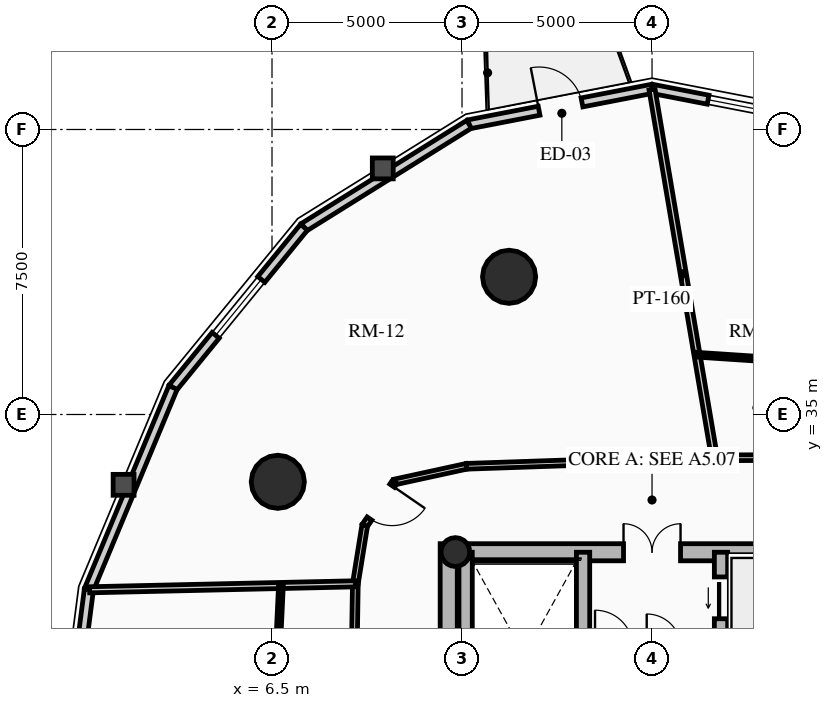
"""IFC4 building model, lengths in metres.
Left out: names, types, materials, properties, quantities, classifications, styles, units other than length and angle.
Written with IfcOpenShell. Run it as: python <this file> out.ifc"""

import sys

from ifc_helpers import new_model, si_unit, direction, frame, frame_2d, origin, origin_2d, place, context, subcontext, project, spatial, rectangle, circle, hollow_circle, extrude, source, transform, mapped, element, fill, save


model = new_model("IFC4")
c1 = context("Model", 3, precision=1e-05, world=origin(), true_north=direction((0.0, 1.0)))
c2 = subcontext(c1, "Body", "Model", "MODEL_VIEW")
j1 = project(units=[si_unit("LENGTHUNIT", "METRE"), si_unit("PLANEANGLEUNIT", "RADIAN")], contexts=[c1])
p1 = place(None, origin())
s1 = spatial("IfcSite", under=j1, at=p1, CompositionType="ELEMENT")
p2 = place(p1, origin())
s2 = spatial("IfcBuilding", under=s1, at=p2, CompositionType="ELEMENT")
p3 = place(p2, frame((0.0, 0.0, 105.07)))
s3 = spatial("IfcBuildingStorey", under=s2, at=p3, CompositionType="ELEMENT", Elevation=105.07)
p4 = place(p3, frame((11.15, 17.4, 0.0), z_axis=(0.0, 0.0, 1.0), x_axis=(0.0, 1.0, 0.0)))
e1 = element("IfcWall", 1, at=p4, inside=s3, PredefinedType="SHEAR", context=c2, shape_type="SweptSolid", body=[
    extrude(rectangle(XDim=14.2, YDim=0.45, at=frame_2d((7.1, 0.0))), origin(), (0.0, 0.0, 1.0), 2.91),
])
p5 = place(p3, frame((11.15, 31.375, 0.0), z_axis=(0.0, 0.0, 1.0), x_axis=(1.0, 0.0, 0.0)))
e2 = element("IfcWall", 2, at=p5, inside=s3, PredefinedType="SHEAR", context=c2, shape_type="SweptSolid", body=[
    extrude(rectangle(XDim=10.7, YDim=0.45, at=frame_2d((5.35, 0.0))), origin(), (0.0, 0.0, 1.0), 2.91),
])
m1 = source(origin(), c2, "Body", "SweptSolid", [
    extrude(rectangle(XDim=1.5, YDim=2.02, at=frame_2d((0.75, 1.01))), frame((0.0, 0.235, 0.0), z_axis=(0.0, -1.0, 0.0), x_axis=(1.0, 0.0, 0.0)), (0.0, 0.0, 1.0), 0.47),
])
p6 = place(p5, frame((4.6, 0.0, 0.0)))
e3 = element("IfcOpeningElement", 3, at=p6, cuts=e2, PredefinedType="OPENING", context=c2, shape_type="MappedRepresentation", body=[
    mapped(m1, transform((0.0, 0.0, 0.0), x_axis=(1.0, 0.0, 0.0), y_axis=(0.0, 1.0, 0.0), z_axis=(0.0, 0.0, 1.0), scale=1.0)),
])
p7 = place(p3, frame((14.685, 17.625, 0.0), z_axis=(0.0, 0.0, 1.0), x_axis=(0.0, 1.0, 0.0)))
e4 = element("IfcWall", 4, at=p7, inside=s3, PredefinedType="SHEAR", context=c2, shape_type="SweptSolid", body=[
    extrude(rectangle(XDim=13.75, YDim=0.35, at=frame_2d((6.875, 0.0))), origin(), (0.0, 0.0, 1.0), 2.91),
])
m2 = source(origin(), c2, "Body", "SweptSolid", [
    extrude(rectangle(XDim=1.1, YDim=2.015, at=frame_2d((0.55, 1.007))), frame((0.0, 0.185, 0.0), z_axis=(0.0, -1.0, 0.0), x_axis=(1.0, 0.0, 0.0)), (0.0, 0.0, 1.0), 0.37),
])
p8 = place(p7, frame((4.875, 0.0, 0.0)))
e5 = element("IfcOpeningElement", 5, at=p8, cuts=e4, PredefinedType="OPENING", context=c2, shape_type="MappedRepresentation", body=[
    mapped(m2, transform((0.0, 0.0, 0.0), x_axis=(1.0, 0.0, 0.0), y_axis=(0.0, 1.0, 0.0), z_axis=(0.0, 0.0, 1.0), scale=1.0)),
])
m3 = source(origin(), c2, "Body", "SweptSolid", [
    extrude(rectangle(XDim=1.15, YDim=2.02, at=frame_2d((0.575, 1.01))), frame((0.0, 0.185, 0.0), z_axis=(0.0, -1.0, 0.0), x_axis=(1.0, 0.0, 0.0)), (0.0, 0.0, 1.0), 0.37),
])
p9 = place(p7, frame((7.295, 0.0, 0.0)))
e6 = element("IfcOpeningElement", 6, at=p9, cuts=e4, PredefinedType="OPENING", context=c2, shape_type="MappedRepresentation", body=[
    mapped(m3, transform((0.0, 0.0, 0.0), x_axis=(1.0, 0.0, 0.0), y_axis=(0.0, 1.0, 0.0), z_axis=(0.0, 0.0, 1.0), scale=1.0)),
])
p10 = place(p3, frame((18.315, 17.625, 0.0), z_axis=(0.0, 0.0, 1.0), x_axis=(0.0, 1.0, 0.0)))
e7 = element("IfcWall", 7, at=p10, inside=s3, PredefinedType="SHEAR", context=c2, shape_type="SweptSolid", body=[
    extrude(rectangle(XDim=13.75, YDim=0.35, at=frame_2d((6.875, 0.0))), origin(), (0.0, 0.0, 1.0), 2.91),
])
p11 = place(p10, frame((10.0, 0.0, 0.0)))
e8 = element("IfcOpeningElement", 8, at=p11, cuts=e7, PredefinedType="OPENING", context=c2, shape_type="MappedRepresentation", body=[
    mapped(m2, transform((0.0, 0.0, 0.0), x_axis=(1.0, 0.0, 0.0), y_axis=(0.0, 1.0, 0.0), z_axis=(0.0, 0.0, 1.0), scale=1.0)),
])
p12 = place(p10, frame((12.0, 0.0, 0.0)))
e9 = element("IfcOpeningElement", 9, at=p12, cuts=e7, PredefinedType="OPENING", context=c2, shape_type="MappedRepresentation", body=[
    mapped(m2, transform((0.0, 0.0, 0.0), x_axis=(1.0, 0.0, 0.0), y_axis=(0.0, 1.0, 0.0), z_axis=(0.0, 0.0, 1.0), scale=1.0)),
])
p13 = place(p10, frame((5.305, 0.0, 0.0)))
e10 = element("IfcOpeningElement", 10, at=p13, cuts=e7, PredefinedType="OPENING", context=c2, shape_type="MappedRepresentation", body=[
    mapped(m3, transform((0.0, 0.0, 0.0), x_axis=(1.0, 0.0, 0.0), y_axis=(0.0, 1.0, 0.0), z_axis=(0.0, 0.0, 1.0), scale=1.0)),
])
p14 = place(p3, frame((11.595, 24.655, 0.0), z_axis=(0.0, 0.0, 1.0), x_axis=(0.0, 1.0, 0.0)))
e11 = element("IfcWall", 11, at=p14, inside=s3, PredefinedType="SHEAR", context=c2, shape_type="SweptSolid", body=[
    extrude(rectangle(XDim=6.72, YDim=0.35, at=frame_2d((3.36, 0.0))), origin(), (0.0, 0.0, 1.0), 2.91),
])
p15 = place(p3, frame((11.325, 31.38, 0.0), z_axis=(0.0, 0.0, 1.0), x_axis=(1.0, 0.0, 0.0)))
e12 = element("IfcColumn", 12, at=p15, inside=s3, PredefinedType="COLUMN", context=c2, shape_type="SweptSolid", body=[
    extrude(hollow_circle(Radius=0.38, WallThickness=0.032, at=origin_2d()), origin(), (0.0, 0.0, 1.0), 2.91),
])
for number, where, z_axis, x_axis in (
    (13, (12.739, 38.623, 0.0), (0.0, 0.0, 1.0), (1.0, 0.0, 0.0)),
    (14, (6.653, 33.229, 0.0), (0.0, 0.0, 1.0), (1.0, 0.0, 0.0)),
):
    element("IfcColumn", number, at=place(p3, frame(where, z_axis=z_axis, x_axis=x_axis)), inside=s3, PredefinedType="USERDEFINED", context=c2, shape_type="SweptSolid", body=[
        extrude(circle(Radius=0.7, at=origin_2d()), origin(), (0.0, 0.0, 1.0), 2.91),
    ])
p16 = place(p3, frame((16.5, 43.57, 0.0), z_axis=(0.0, 0.0, 1.0), x_axis=(0.981723785992, -0.190311344954, 0.0)))
e15 = element("IfcWall", 15, at=p16, inside=s3, PredefinedType="SOLIDWALL", context=c2, shape_type="SweptSolid", body=[
    extrude(rectangle(XDim=4.904, YDim=0.24, at=frame_2d((2.452, 0.0))), origin(), (0.0, 0.0, 1.0), 2.179),
])
m4 = source(origin(), c2, "Body", "SweptSolid", [
    extrude(rectangle(XDim=1.9, YDim=1.35, at=frame_2d((0.95, 0.675))), frame((0.0, 0.13, 0.0), z_axis=(0.0, -1.0, 0.0), x_axis=(1.0, 0.0, 0.0)), (0.0, 0.0, 1.0), 0.26),
])
p17 = place(p16, frame((1.502, 0.0, 0.65)))
e16 = element("IfcOpeningElement", 16, at=p17, cuts=e15, PredefinedType="OPENING", context=c2, shape_type="MappedRepresentation", body=[
    mapped(m4, transform((0.0, 0.0, 0.0), x_axis=(1.0, 0.0, 0.0), y_axis=(0.0, 1.0, 0.0), z_axis=(0.0, 0.0, 1.0), scale=1.0)),
])
p18 = place(p3, frame((11.685, 42.637, 0.0), z_axis=(0.0, 0.0, 1.0), x_axis=(0.981723785992, 0.190311344954, 0.0)))
e17 = element("IfcWall", 17, at=p18, inside=s3, PredefinedType="SOLIDWALL", context=c2, shape_type="SweptSolid", body=[
    extrude(rectangle(XDim=4.904, YDim=0.24, at=frame_2d((2.452, 0.0))), origin(), (0.0, 0.0, 1.0), 2.179),
])
m5 = source(origin(), c2, "Body", "SweptSolid", [
    extrude(rectangle(XDim=1.15, YDim=2.005, at=frame_2d((0.575, 1.002))), frame((0.0, 0.13, 0.0), z_axis=(0.0, -1.0, 0.0), x_axis=(1.0, 0.0, 0.0)), (0.0, 0.0, 1.0), 0.26),
])
p19 = place(p18, frame((1.877, 0.0, 0.0)))
e18 = element("IfcOpeningElement", 18, at=p19, cuts=e17, PredefinedType="OPENING", context=c2, shape_type="MappedRepresentation", body=[
    mapped(m5, transform((0.0, 0.0, 0.0), x_axis=(1.0, 0.0, 0.0), y_axis=(0.0, 1.0, 0.0), z_axis=(0.0, 0.0, 1.0), scale=1.0)),
])
p20 = place(p3, frame((7.342, 39.928, 0.0), z_axis=(0.0, 0.0, 1.0), x_axis=(0.848520380187, 0.529162701263, 0.0)))
e19 = element("IfcWall", 19, at=p20, inside=s3, PredefinedType="SOLIDWALL", context=c2, shape_type="SweptSolid", body=[
    extrude(rectangle(XDim=5.119, YDim=0.24, at=frame_2d((2.56, 0.0))), origin(), (0.0, 0.0, 1.0), 2.179),
])
p21 = place(p3, frame((3.895, 35.709, 0.0), z_axis=(0.0, 0.0, 1.0), x_axis=(0.632700781152, 0.77439635945, 0.0)))
e20 = element("IfcWall", 20, at=p21, inside=s3, PredefinedType="SOLIDWALL", context=c2, shape_type="SweptSolid", body=[
    extrude(rectangle(XDim=5.448, YDim=0.24, at=frame_2d((2.724, 0.0))), origin(), (0.0, 0.0, 1.0), 2.179),
])
p22 = place(p21, frame((1.774, 0.0, 0.65)))
e21 = element("IfcOpeningElement", 21, at=p22, cuts=e20, PredefinedType="OPENING", context=c2, shape_type="MappedRepresentation", body=[
    mapped(m4, transform((0.0, 0.0, 0.0), x_axis=(1.0, 0.0, 0.0), y_axis=(0.0, 1.0, 0.0), z_axis=(0.0, 0.0, 1.0), scale=1.0)),
])
p23 = place(p3, frame((1.682, 30.393, 0.0), z_axis=(0.0, 0.0, 1.0), x_axis=(0.384344417632, 0.923189779317, 0.0)))
e22 = element("IfcWall", 22, at=p23, inside=s3, PredefinedType="SOLIDWALL", context=c2, shape_type="SweptSolid", body=[
    extrude(rectangle(XDim=5.758, YDim=0.24, at=frame_2d((2.879, 0.0))), origin(), (0.0, 0.0, 1.0), 2.179),
])
p24 = place(p3, frame((0.919, 24.5, 0.0), z_axis=(0.0, 0.0, 1.0), x_axis=(0.128351991996, 0.991728675672, 0.0)))
e23 = element("IfcWall", 23, at=p24, inside=s3, PredefinedType="SOLIDWALL", context=c2, shape_type="SweptSolid", body=[
    extrude(rectangle(XDim=5.942, YDim=0.24, at=frame_2d((2.971, 0.0))), origin(), (0.0, 0.0, 1.0), 2.179),
])
m6 = source(origin(), c2, "Body", "SweptSolid", [
    extrude(rectangle(XDim=2.2, YDim=1.35, at=frame_2d((1.1, 0.675))), frame((0.0, 0.13, 0.0), z_axis=(0.0, -1.0, 0.0), x_axis=(1.0, 0.0, 0.0)), (0.0, 0.0, 1.0), 0.26),
])
p25 = place(p24, frame((1.871, 0.0, 0.65)))
e24 = element("IfcOpeningElement", 24, at=p25, cuts=e23, PredefinedType="OPENING", context=c2, shape_type="MappedRepresentation", body=[
    mapped(m6, transform((0.0, 0.0, 0.0), x_axis=(1.0, 0.0, 0.0), y_axis=(0.0, 1.0, 0.0), z_axis=(0.0, 0.0, 1.0), scale=1.0)),
])
p26 = place(p3, frame((21.527, 33.873, 0.0), z_axis=(0.0, 0.0, 1.0), x_axis=(-0.999991838845, -0.004040079574, 0.0)))
e25 = element("IfcWall", 25, at=p26, inside=s3, PredefinedType="PARTITIONING", context=c2, shape_type="SweptSolid", body=[
    extrude(rectangle(XDim=3.384, YDim=0.15, at=frame_2d((1.692, 0.0))), origin(), (0.0, 0.0, 1.0), 2.225),
])
p27 = place(p3, frame((18.143, 33.86, 0.0), z_axis=(0.0, 0.0, 1.0), x_axis=(-0.999419208319, -0.034077060363, 0.0)))
e26 = element("IfcWall", 26, at=p27, inside=s3, PredefinedType="PARTITIONING", context=c2, shape_type="SweptSolid", body=[
    extrude(rectangle(XDim=6.527, YDim=0.15, at=frame_2d((3.263, 0.0))), origin(), (0.0, 0.0, 1.0), 2.225),
])
p28 = place(p3, frame((11.62, 33.637, 0.0), z_axis=(0.0, 0.0, 1.0), x_axis=(-0.97702579435, -0.213121085711, 0.0)))
e27 = element("IfcWall", 27, at=p28, inside=s3, PredefinedType="PARTITIONING", context=c2, shape_type="SweptSolid", body=[
    extrude(rectangle(XDim=1.935, YDim=0.15, at=frame_2d((0.967, 0.0))), origin(), (0.0, 0.0, 1.0), 2.225),
])
p29 = place(p3, frame((9.729, 33.225, 0.0), z_axis=(0.0, 0.0, 1.0), x_axis=(-0.567183649484, -0.82359134755, 0.0)))
e28 = element("IfcWall", 28, at=p29, inside=s3, PredefinedType="PARTITIONING", context=c2, shape_type="SweptSolid", body=[
    extrude(rectangle(XDim=1.392, YDim=0.15, at=frame_2d((0.696, 0.0))), origin(), (0.0, 0.0, 1.0), 2.225),
])
m7 = source(origin(), c2, "Body", "SweptSolid", [
    extrude(rectangle(XDim=1.05, YDim=2.015, at=frame_2d((0.525, 1.007))), frame((0.0, 0.085, 0.0), z_axis=(0.0, -1.0, 0.0), x_axis=(1.0, 0.0, 0.0)), (0.0, 0.0, 1.0), 0.17),
])
p30 = place(p29, frame((0.12, 0.0, 0.0)))
e29 = element("IfcOpeningElement", 29, at=p30, cuts=e28, PredefinedType="OPENING", context=c2, shape_type="MappedRepresentation", body=[
    mapped(m7, transform((0.0, 0.0, 0.0), x_axis=(1.0, 0.0, 0.0), y_axis=(0.0, 1.0, 0.0), z_axis=(0.0, 0.0, 1.0), scale=1.0)),
])
p31 = place(p3, frame((8.94, 32.078, 0.0), z_axis=(0.0, 0.0, 1.0), x_axis=(-0.159148467753, -0.98725466077, 0.0)))
e30 = element("IfcWall", 30, at=p31, inside=s3, PredefinedType="PARTITIONING", context=c2, shape_type="SweptSolid", body=[
    extrude(rectangle(XDim=1.554, YDim=0.15, at=frame_2d((0.777, 0.0))), origin(), (0.0, 0.0, 1.0), 2.225),
])
p32 = place(p3, frame((8.693, 30.544, 0.0), z_axis=(0.0, 0.0, 1.0), x_axis=(-0.015307007986, -0.99988284089, 0.0)))
e31 = element("IfcWall", 31, at=p32, inside=s3, PredefinedType="PARTITIONING", context=c2, shape_type="SweptSolid", body=[
    extrude(rectangle(XDim=6.045, YDim=0.15, at=frame_2d((3.022, 0.0))), origin(), (0.0, 0.0, 1.0), 2.655),
])
p33 = place(p3, frame((18.143, 33.86, 0.0), z_axis=(0.0, 0.0, 1.0), x_axis=(-0.167145472003, 0.985932244725, 0.0)))
e32 = element("IfcWall", 32, at=p33, inside=s3, PredefinedType="PARTITIONING", context=c2, shape_type="SweptSolid", body=[
    extrude(rectangle(XDim=9.829, YDim=0.16, at=frame_2d((4.914, 0.0))), origin(), (0.0, 0.0, 1.0), 2.179),
])
p34 = place(p3, frame((8.693, 30.544, 0.0), z_axis=(0.0, 0.0, 1.0), x_axis=(-0.999746482141, -0.022516026432, 0.0)))
e33 = element("IfcWall", 33, at=p34, inside=s3, PredefinedType="PARTITIONING", context=c2, shape_type="SweptSolid", body=[
    extrude(rectangle(XDim=6.994, YDim=0.16, at=frame_2d((3.497, 0.0))), origin(), (0.0, 0.0, 1.0), 2.179),
])
p35 = place(p3, frame((21.466, 36.322, 0.0), z_axis=(0.0, 0.0, 1.0), x_axis=(-0.997806476515, 0.066198454847, 0.0)))
e34 = element("IfcWall", 34, at=p35, inside=s3, PredefinedType="PARTITIONING", context=c2, shape_type="SweptSolid", body=[
    extrude(rectangle(XDim=3.791, YDim=0.125, at=frame_2d((1.896, 0.0))), origin(), (0.0, 0.0, 1.0), 2.225),
])
p36 = place(p3, frame((6.735, 30.5, 0.0), z_axis=(0.0, 0.0, 1.0), x_axis=(-0.046620801603, -0.998912659274, 0.0)))
e35 = element("IfcWall", 35, at=p36, inside=s3, PredefinedType="PARTITIONING", context=c2, shape_type="SweptSolid", body=[
    extrude(rectangle(XDim=6.007, YDim=0.125, at=frame_2d((3.003, 0.0))), origin(), (0.0, 0.0, 1.0), 2.655),
])
m8 = source(origin(), c2, "Body", "SweptSolid", [
    extrude(rectangle(XDim=1.9, YDim=1.35, at=frame_2d((0.95, 0.675))), frame((0.0, 0.03, 0.0), z_axis=(0.0, -1.0, 0.0), x_axis=(1.0, 0.0, 0.0)), (0.0, 0.0, 1.0), 0.06),
])
p37 = place(p17, origin())
e36 = element("IfcWindow", 36, at=p37, inside=s3, PartitioningType="DOUBLE_PANEL_VERTICAL", PredefinedType="WINDOW", context=c2, shape_type="MappedRepresentation", body=[
    mapped(m8, transform((0.0, 0.0, 0.0), x_axis=(1.0, 0.0, 0.0), y_axis=(0.0, 1.0, 0.0), z_axis=(0.0, 0.0, 1.0), scale=1.0)),
])
fill(e16, e36)
m9 = source(origin(), c2, "Body", "SweptSolid", [
    extrude(rectangle(XDim=1.15, YDim=2.005, at=frame_2d((0.575, 1.002))), frame((0.0, 0.025, 0.0), z_axis=(0.0, -1.0, 0.0), x_axis=(1.0, 0.0, 0.0)), (0.0, 0.0, 1.0), 0.05),
])
p38 = place(p19, origin())
e37 = element("IfcDoor", 37, at=p38, inside=s3, OperationType="SINGLE_SWING_LEFT", PredefinedType="DOOR", context=c2, shape_type="MappedRepresentation", body=[
    mapped(m9, transform((0.0, 0.0, 0.0), x_axis=(1.0, 0.0, 0.0), y_axis=(0.0, 1.0, 0.0), z_axis=(0.0, 0.0, 1.0), scale=1.0)),
])
fill(e18, e37)
p39 = place(p22, origin())
e38 = element("IfcWindow", 38, at=p39, inside=s3, PartitioningType="DOUBLE_PANEL_VERTICAL", PredefinedType="WINDOW", context=c2, shape_type="MappedRepresentation", body=[
    mapped(m8, transform((0.0, 0.0, 0.0), x_axis=(1.0, 0.0, 0.0), y_axis=(0.0, 1.0, 0.0), z_axis=(0.0, 0.0, 1.0), scale=1.0)),
])
fill(e21, e38)
m10 = source(origin(), c2, "Body", "SweptSolid", [
    extrude(rectangle(XDim=1.1, YDim=2.015, at=frame_2d((0.55, 1.007))), frame((0.0, 0.025, 0.0), z_axis=(0.0, -1.0, 0.0), x_axis=(1.0, 0.0, 0.0)), (0.0, 0.0, 1.0), 0.05),
])
p40 = place(p12, origin())
e39 = element("IfcDoor", 39, at=p40, inside=s3, OperationType="SLIDING_TO_LEFT", PredefinedType="DOOR", context=c2, shape_type="MappedRepresentation", body=[
    mapped(m10, transform((0.0, 0.0, 0.0), x_axis=(1.0, 0.0, 0.0), y_axis=(0.0, 1.0, 0.0), z_axis=(0.0, 0.0, 1.0), scale=1.0)),
])
fill(e9, e39)
m11 = source(origin(), c2, "Body", "SweptSolid", [
    extrude(rectangle(XDim=1.5, YDim=2.02, at=frame_2d((0.75, 1.01))), frame((0.0, 0.025, 0.0), z_axis=(0.0, -1.0, 0.0), x_axis=(1.0, 0.0, 0.0)), (0.0, 0.0, 1.0), 0.05),
])
p41 = place(p6, origin())
e40 = element("IfcDoor", 40, at=p41, inside=s3, OperationType="DOUBLE_DOOR_SINGLE_SWING", PredefinedType="DOOR", context=c2, shape_type="MappedRepresentation", body=[
    mapped(m11, transform((0.0, 0.0, 0.0), x_axis=(1.0, 0.0, 0.0), y_axis=(0.0, 1.0, 0.0), z_axis=(0.0, 0.0, 1.0), scale=1.0)),
])
fill(e3, e40)
m12 = source(origin(), c2, "Body", "SweptSolid", [
    extrude(rectangle(XDim=1.05, YDim=2.015, at=frame_2d((0.525, 1.007))), frame((0.0, 0.025, 0.0), z_axis=(0.0, -1.0, 0.0), x_axis=(1.0, 0.0, 0.0)), (0.0, 0.0, 1.0), 0.05),
])
p42 = place(p30, origin())
e41 = element("IfcDoor", 41, at=p42, inside=s3, OperationType="SINGLE_SWING_LEFT", PredefinedType="DOOR", context=c2, shape_type="MappedRepresentation", body=[
    mapped(m12, transform((0.0, 0.0, 0.0), x_axis=(1.0, 0.0, 0.0), y_axis=(0.0, 1.0, 0.0), z_axis=(0.0, 0.0, 1.0), scale=1.0)),
])
fill(e29, e41)
save(model, sys.argv[1])
